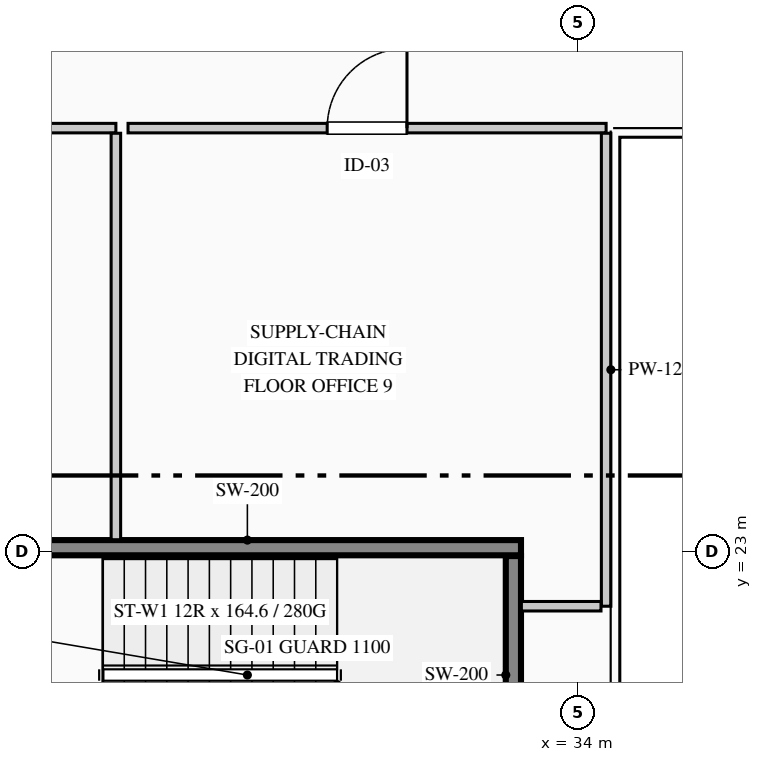
"""IFC4 building model, lengths in metres.
Left out: names, types, materials, properties, quantities, classifications, styles, units other than length and angle.
Written with IfcOpenShell. Run it as: python <this file> out.ifc"""

import sys

from ifc_helpers import new_model, si_unit, direction, frame, frame_2d, origin, place, context, subcontext, project, spatial, rectangle, extrude, element, fill, save


model = new_model("IFC4")
c1 = context("Model", 3, precision=1e-05, world=origin(), true_north=direction((0.0, 1.0)))
c2 = subcontext(c1, "Body", "Model", "MODEL_VIEW")
j1 = project(units=[si_unit("LENGTHUNIT", "METRE"), si_unit("PLANEANGLEUNIT", "RADIAN")], contexts=[c1])
p1 = place(None, origin())
s1 = spatial("IfcSite", under=j1, at=p1, CompositionType="ELEMENT")
p2 = place(p1, origin())
s2 = spatial("IfcBuilding", under=s1, at=p2, CompositionType="ELEMENT")
p3 = place(p2, frame((0.0, 0.0, 154.85)))
s3 = spatial("IfcBuildingStorey", under=s2, at=p3, CompositionType="ELEMENT", Elevation=154.85)
p4 = place(p3, frame((26.05, 23.05, 0.0), z_axis=(0.0, 0.0, 1.0), x_axis=(1.0, 0.0, 0.0)))
e1 = element("IfcWall", 1, at=p4, inside=s3, PredefinedType="SHEAR", context=c2, shape_type="SweptSolid", body=[
    extrude(rectangle(XDim=7.2, YDim=0.2, at=frame_2d((3.6, 0.0))), origin(), (0.0, 0.0, 1.0), 3.95),
])
p5 = place(p3, frame((33.15, 19.81, 0.0), z_axis=(0.0, 0.0, 1.0), x_axis=(0.0, 1.0, 0.0)))
e2 = element("IfcWall", 2, at=p5, inside=s3, PredefinedType="SHEAR", context=c2, shape_type="SweptSolid", body=[
    extrude(rectangle(XDim=3.13, YDim=0.2, at=frame_2d((1.565, 0.0))), origin(), (0.0, 0.0, 1.0), 3.95),
])
p6 = place(p3, frame((22.89, 28.57, 0.0), z_axis=(0.0, 0.0, 1.0), x_axis=(1.0, 0.0, 0.0)))
e3 = element("IfcWall", 3, at=p6, inside=s3, PredefinedType="PARTITIONING", context=c2, shape_type="SweptSolid", body=[
    extrude(rectangle(XDim=5.03, YDim=0.125, at=frame_2d((2.515, 0.0))), origin(), (0.0, 0.0, 1.0), 3.475),
])
p7 = place(p6, frame((1.99, 0.0, 0.0)))
e4 = element("IfcOpeningElement", 4, at=p7, cuts=e3, PredefinedType="OPENING", context=c2, shape_type="SweptSolid", body=[
    extrude(rectangle(XDim=1.05, YDim=2.15, at=frame_2d((0.525, 1.075))), frame((0.0, 0.073, 0.0), z_axis=(0.0, -1.0, 0.0), x_axis=(1.0, 0.0, 0.0)), (0.0, 0.0, 1.0), 0.145),
])
p8 = place(p3, frame((27.92, 28.502, 0.0), z_axis=(0.0, 0.0, 1.0), x_axis=(0.0, -1.0, 0.0)))
e5 = element("IfcWall", 5, at=p8, inside=s3, PredefinedType="PARTITIONING", context=c2, shape_type="SweptSolid", body=[
    extrude(rectangle(XDim=5.347, YDim=0.125, at=frame_2d((2.674, 0.0))), origin(), (0.0, 0.0, 1.0), 3.69),
])
p9 = place(p3, frame((28.08, 28.57, 0.0), z_axis=(0.0, 0.0, 1.0), x_axis=(1.0, 0.0, 0.0)))
e6 = element("IfcWall", 6, at=p9, inside=s3, PredefinedType="PARTITIONING", context=c2, shape_type="SweptSolid", body=[
    extrude(rectangle(XDim=6.29, YDim=0.125, at=frame_2d((3.145, 0.0))), origin(), (0.0, 0.0, 1.0), 3.475),
])
p10 = place(p9, frame((2.62, 0.0, 0.0)))
e7 = element("IfcOpeningElement", 7, at=p10, cuts=e6, PredefinedType="OPENING", context=c2, shape_type="SweptSolid", body=[
    extrude(rectangle(XDim=1.05, YDim=2.15, at=frame_2d((0.525, 1.075))), frame((0.0, 0.073, 0.0), z_axis=(0.0, -1.0, 0.0), x_axis=(1.0, 0.0, 0.0)), (0.0, 0.0, 1.0), 0.145),
])
p11 = place(p3, frame((34.37, 28.502, 0.0), z_axis=(0.0, 0.0, 1.0), x_axis=(0.0, -1.0, 0.0)))
e8 = element("IfcWall", 8, at=p11, inside=s3, PredefinedType="PARTITIONING", context=c2, shape_type="SweptSolid", body=[
    extrude(rectangle(XDim=6.222, YDim=0.125, at=frame_2d((3.111, 0.0))), origin(), (0.0, 0.0, 1.0), 3.69),
])
p12 = place(p3, frame((34.302, 22.28, 0.0), z_axis=(0.0, 0.0, 1.0), x_axis=(-1.0, 0.0, 0.0)))
e9 = element("IfcWall", 9, at=p12, inside=s3, PredefinedType="PARTITIONING", context=c2, shape_type="SweptSolid", body=[
    extrude(rectangle(XDim=1.048, YDim=0.125, at=frame_2d((0.524, 0.0))), origin(), (0.0, 0.0, 1.0), 3.69),
])
p13 = place(p10, origin())
e10 = element("IfcDoor", 10, at=p13, inside=s3, OperationType="SINGLE_SWING_RIGHT", PredefinedType="DOOR", context=c2, shape_type="SweptSolid", body=[
    extrude(rectangle(XDim=1.05, YDim=2.15, at=frame_2d((0.525, 1.075))), frame((0.0, 0.025, 0.0), z_axis=(0.0, -1.0, 0.0), x_axis=(1.0, 0.0, 0.0)), (0.0, 0.0, 1.0), 0.05),
])
fill(e7, e10)
save(model, sys.argv[1])
